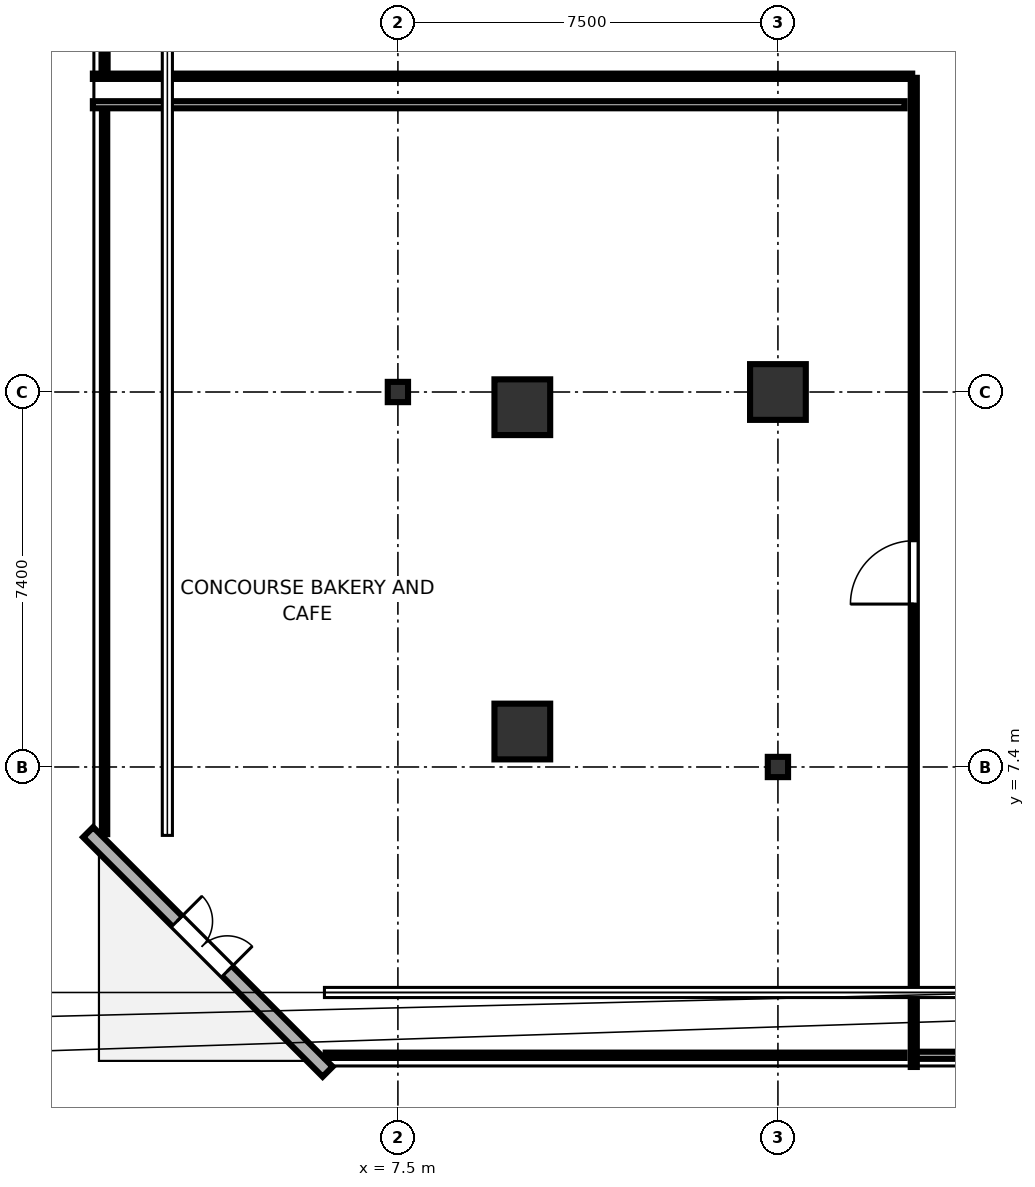
"""IFC4 building model, lengths in metres.
Left out: names, types, materials, properties, quantities, classifications, styles, units other than length and angle.
Written with IfcOpenShell. Run it as: python <this file> out.ifc"""

import sys

from ifc_helpers import new_model, si_unit, direction, frame, frame_2d, origin, origin_2d, place, context, subcontext, project, spatial, rectangle, i_section, extrude, element, fill, save


model = new_model("IFC4")
c1 = context("Model", 3, precision=1e-05, world=origin(), true_north=direction((0.0, 1.0)))
c2 = subcontext(c1, "Body", "Model", "MODEL_VIEW")
j1 = project(units=[si_unit("LENGTHUNIT", "METRE"), si_unit("PLANEANGLEUNIT", "RADIAN")], contexts=[c1])
p1 = place(None, origin())
s1 = spatial("IfcSite", under=j1, at=p1, CompositionType="ELEMENT")
p2 = place(p1, origin())
s2 = spatial("IfcBuilding", under=s1, at=p2, CompositionType="ELEMENT")
p3 = place(p2, origin())
s3 = spatial("IfcBuildingStorey", under=s2, at=p3, CompositionType="ELEMENT", Elevation=0.0)
for number, where, z_axis, x_axis in (
    (1, (9.955, 8.1, 0.0), (0.0, 0.0, 1.0), (1.0, 0.0, 0.0)),
    (2, (9.955, 14.5, 0.0), (0.0, 0.0, 1.0), (1.0, 0.0, 0.0)),
):
    element("IfcColumn", number, at=place(p3, frame(where, z_axis=z_axis, x_axis=x_axis)), inside=s3, PredefinedType="COLUMN", context=c2, shape_type="SweptSolid", body=[
        extrude(rectangle(XDim=1.1, YDim=1.1, at=origin_2d()), origin(), (0.0, 0.0, 1.0), 6.0),
    ])
for number, where, z_axis, x_axis in (
    (3, (7.5, 14.8, 0.0), (0.0, 0.0, 1.0), (1.0, 0.0, 0.0)),
    (4, (15.0, 7.4, 0.0), (0.0, 0.0, 1.0), (1.0, 0.0, 0.0)),
):
    element("IfcColumn", number, at=place(p3, frame(where, z_axis=z_axis, x_axis=x_axis)), inside=s3, PredefinedType="COLUMN", context=c2, shape_type="SweptSolid", body=[
        extrude(i_section(OverallWidth=0.4, OverallDepth=0.4, WebThickness=0.013, FlangeThickness=0.021, at=origin_2d()), origin(), (0.0, 0.0, 1.0), 6.0),
    ])
p4 = place(p3, frame((15.0, 14.8, 0.0), z_axis=(0.0, 0.0, 1.0), x_axis=(1.0, 0.0, 0.0)))
e5 = element("IfcColumn", 5, at=p4, inside=s3, PredefinedType="COLUMN", context=c2, shape_type="SweptSolid", body=[
    extrude(rectangle(XDim=1.1, YDim=1.1, at=origin_2d()), origin(), (0.0, 0.0, 1.0), 6.0),
])
p5 = place(p3, frame((1.387, 6.113, 0.0), z_axis=(0.0, 0.0, 1.0), x_axis=(0.707106781187, -0.707106781187, 0.0)))
e6 = element("IfcWall", 6, at=p5, inside=s3, PredefinedType="SOLIDWALL", context=c2, shape_type="SweptSolid", body=[
    extrude(rectangle(XDim=6.684, YDim=0.28, at=frame_2d((3.342, 0.0))), origin(), (0.0, 0.0, 1.0), 5.78),
])
p6 = place(p5, frame((2.482, 0.0, 0.0)))
e7 = element("IfcOpeningElement", 7, at=p6, cuts=e6, PredefinedType="OPENING", context=c2, shape_type="SweptSolid", body=[
    extrude(rectangle(XDim=1.4, YDim=2.2, at=frame_2d((0.7, 1.1))), frame((0.0, 0.15, 0.0), z_axis=(0.0, -1.0, 0.0), x_axis=(1.0, 0.0, 0.0)), (0.0, 0.0, 1.0), 0.3),
])
p7 = place(p3, frame((1.711, 21.0, 0.0), z_axis=(0.0, 0.0, 1.0), x_axis=(0.0, 1.0, 0.0)))
e8 = element("IfcWall", 8, at=p7, inside=s3, PredefinedType="PARTITIONING", context=c2, shape_type="SweptSolid", body=[
    extrude(rectangle(XDim=10.0, YDim=0.12, at=frame_2d((5.0, 0.0))), origin(), (0.0, 0.0, 1.0), 5.1),
])
p8 = place(p3, frame((56.35, 1.711, 0.0), z_axis=(0.0, 0.0, 1.0), x_axis=(-1.0, 0.0, 0.0)))
e9 = element("IfcWall", 9, at=p8, inside=s3, PredefinedType="PARTITIONING", context=c2, shape_type="SweptSolid", body=[
    extrude(rectangle(XDim=38.7, YDim=0.14, at=frame_2d((19.35, 0.0))), origin(), (0.0, 0.0, 1.0), 5.1),
])
p9 = place(p3, frame((17.681, 1.48, 0.0), z_axis=(0.0, 0.0, 1.0), x_axis=(0.0, 1.0, 0.0)))
e10 = element("IfcWall", 10, at=p9, inside=s3, PredefinedType="PARTITIONING", context=c2, shape_type="SweptSolid", body=[
    extrude(rectangle(XDim=19.52, YDim=0.12, at=frame_2d((9.76, 0.0))), origin(), (0.0, 0.0, 1.0), 5.1),
])
p10 = place(p9, frame((9.135, 0.0, 0.0)))
e11 = element("IfcOpeningElement", 11, at=p10, cuts=e10, PredefinedType="OPENING", context=c2, shape_type="SweptSolid", body=[
    extrude(rectangle(XDim=1.25, YDim=2.2, at=frame_2d((0.625, 1.1))), frame((0.0, 0.07, 0.0), z_axis=(0.0, -1.0, 0.0), x_axis=(1.0, 0.0, 0.0)), (0.0, 0.0, 1.0), 0.14),
])
p11 = place(p3, frame((17.65, 21.031, 0.0), z_axis=(0.0, 0.0, 1.0), x_axis=(-1.0, 0.0, 0.0)))
e12 = element("IfcWall", 12, at=p11, inside=s3, PredefinedType="PARTITIONING", context=c2, shape_type="SweptSolid", body=[
    extrude(rectangle(XDim=16.17, YDim=0.105, at=frame_2d((8.085, 0.0))), origin(), (0.0, 0.0, 1.0), 5.1),
])
p12 = place(p3, frame((1.711, 6.075, 0.0), z_axis=(0.0, 0.0, 1.0), x_axis=(0.0, 1.0, 0.0)))
e13 = element("IfcWall", 13, at=p12, inside=s3, PredefinedType="PARTITIONING", context=c2, shape_type="SweptSolid", body=[
    extrude(rectangle(XDim=14.425, YDim=0.105, at=frame_2d((7.213, 0.0))), origin(), (0.0, 0.0, 1.0), 5.1),
])
p13 = place(p3, frame((1.48, 20.469, 0.0), z_axis=(0.0, 0.0, 1.0), x_axis=(1.0, 0.0, 0.0)))
e14 = element("IfcWall", 14, at=p13, inside=s3, PredefinedType="PARTITIONING", context=c2, shape_type="SweptSolid", body=[
    extrude(rectangle(XDim=16.02, YDim=0.14, at=frame_2d((8.01, 0.0))), origin(), (0.0, 0.0, 1.0), 5.1),
])
p14 = place(p3, frame((17.5, 1.711, 0.0), z_axis=(0.0, 0.0, 1.0), x_axis=(-1.0, 0.0, 0.0)))
e15 = element("IfcWall", 15, at=p14, inside=s3, PredefinedType="PARTITIONING", context=c2, shape_type="SweptSolid", body=[
    extrude(rectangle(XDim=11.425, YDim=0.105, at=frame_2d((5.713, 0.0))), origin(), (0.0, 0.0, 1.0), 5.1),
])
p15 = place(p6, origin())
e16 = element("IfcDoor", 16, at=p15, inside=s3, OperationType="DOUBLE_DOOR_SINGLE_SWING", PredefinedType="DOOR", context=c2, shape_type="SweptSolid", body=[
    extrude(rectangle(XDim=1.4, YDim=2.2, at=frame_2d((0.7, 1.1))), frame((0.0, 0.025, 0.0), z_axis=(0.0, -1.0, 0.0), x_axis=(1.0, 0.0, 0.0)), (0.0, 0.0, 1.0), 0.05),
])
fill(e7, e16)
p16 = place(p10, origin())
e17 = element("IfcDoor", 17, at=p16, inside=s3, OperationType="SINGLE_SWING_LEFT", PredefinedType="DOOR", context=c2, shape_type="SweptSolid", body=[
    extrude(rectangle(XDim=1.25, YDim=2.2, at=frame_2d((0.625, 1.1))), frame((0.0, 0.025, 0.0), z_axis=(0.0, -1.0, 0.0), x_axis=(1.0, 0.0, 0.0)), (0.0, 0.0, 1.0), 0.05),
])
fill(e11, e17)
save(model, sys.argv[1])
